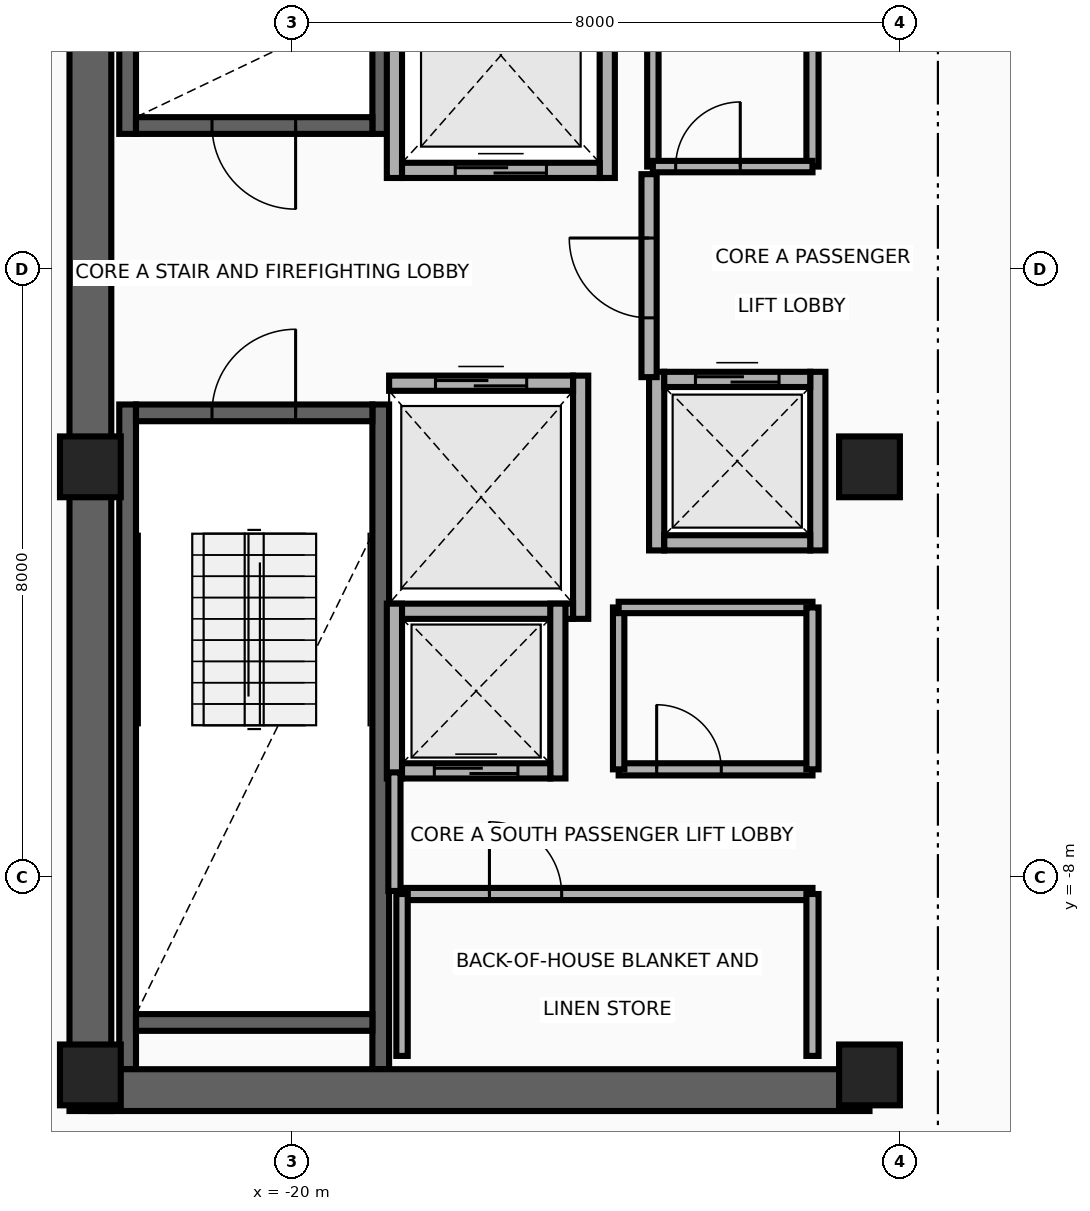
"""IFC4 building model, lengths in metres.
Left out: names, types, materials, properties, quantities, classifications, styles, units other than length and angle.
Written with IfcOpenShell. Run it as: python <this file> out.ifc"""

import sys

from ifc_helpers import new_model, si_unit, direction, frame, frame_2d, origin, origin_2d, place, context, subcontext, project, spatial, rectangle, extrude, source, transform, mapped, element, fill, save


model = new_model("IFC4")
c1 = context("Model", 3, precision=1e-05, world=origin(), true_north=direction((0.0, 1.0)))
c2 = subcontext(c1, "Body", "Model", "MODEL_VIEW")
j1 = project(units=[si_unit("LENGTHUNIT", "METRE"), si_unit("PLANEANGLEUNIT", "RADIAN")], contexts=[c1])
p1 = place(None, origin())
s1 = spatial("IfcSite", under=j1, at=p1, CompositionType="ELEMENT")
p2 = place(p1, origin())
s2 = spatial("IfcBuilding", under=s1, at=p2, CompositionType="ELEMENT")
p3 = place(p2, frame((0.0, 0.0, 276.5)))
s3 = spatial("IfcBuildingStorey", under=s2, at=p3, CompositionType="ELEMENT", Elevation=276.5)
for number, where, z_axis, x_axis in (
    (1, (-22.16, 1.78, 0.0), (0.0, 0.0, 1.0), (0.0, 1.0, 0.0)),
    (2, (-18.83, 1.78, 0.0), (0.0, 0.0, 1.0), (0.0, 1.0, 0.0)),
):
    element("IfcWall", number, at=place(p3, frame(where, z_axis=z_axis, x_axis=x_axis)), inside=s3, PredefinedType="SHEAR", context=c2, shape_type="SweptSolid", body=[
        extrude(rectangle(XDim=8.745, YDim=0.22, at=frame_2d((4.373, 0.0))), origin(), (0.0, 0.0, 1.0), 3.26),
    ])
p4 = place(p3, frame((-22.05, 1.89, 0.0), z_axis=(0.0, 0.0, 1.0), x_axis=(1.0, 0.0, 0.0)))
e3 = element("IfcWall", 3, at=p4, inside=s3, PredefinedType="SHEAR", context=c2, shape_type="SweptSolid", body=[
    extrude(rectangle(XDim=3.11, YDim=0.22, at=frame_2d((1.555, 0.0))), origin(), (0.0, 0.0, 1.0), 3.26),
])
p5 = place(p4, frame((1.0, 0.0, 0.0)))
e4 = element("IfcOpeningElement", 4, at=p5, cuts=e3, PredefinedType="OPENING", context=c2, shape_type="SweptSolid", body=[
    extrude(rectangle(XDim=1.1, YDim=2.15, at=frame_2d((0.55, 1.075))), frame((0.0, 0.125, 0.0), z_axis=(0.0, -1.0, 0.0), x_axis=(1.0, 0.0, 0.0)), (0.0, 0.0, 1.0), 0.25),
])
for number, where, z_axis, x_axis in (
    (5, (-22.16, -10.525, 0.0), (0.0, 0.0, 1.0), (0.0, 1.0, 0.0)),
    (6, (-18.83, -10.525, 0.0), (0.0, 0.0, 1.0), (0.0, 1.0, 0.0)),
):
    element("IfcWall", number, at=place(p3, frame(where, z_axis=z_axis, x_axis=x_axis)), inside=s3, PredefinedType="SHEAR", context=c2, shape_type="SweptSolid", body=[
        extrude(rectangle(XDim=8.745, YDim=0.22, at=frame_2d((4.373, 0.0))), origin(), (0.0, 0.0, 1.0), 3.26),
    ])
p6 = place(p3, frame((-22.05, -9.91, 0.0), z_axis=(0.0, 0.0, 1.0), x_axis=(1.0, 0.0, 0.0)))
e7 = element("IfcWall", 7, at=p6, inside=s3, PredefinedType="SHEAR", context=c2, shape_type="SweptSolid", body=[
    extrude(rectangle(XDim=3.11, YDim=0.22, at=frame_2d((1.555, 0.0))), origin(), (0.0, 0.0, 1.0), 3.26),
])
p7 = place(p3, frame((-22.05, -1.89, 0.0), z_axis=(0.0, 0.0, 1.0), x_axis=(1.0, 0.0, 0.0)))
e8 = element("IfcWall", 8, at=p7, inside=s3, PredefinedType="SHEAR", context=c2, shape_type="SweptSolid", body=[
    extrude(rectangle(XDim=3.11, YDim=0.22, at=frame_2d((1.555, 0.0))), origin(), (0.0, 0.0, 1.0), 3.26),
])
p8 = place(p7, frame((1.0, 0.0, 0.0)))
e9 = element("IfcOpeningElement", 9, at=p8, cuts=e8, PredefinedType="OPENING", context=c2, shape_type="SweptSolid", body=[
    extrude(rectangle(XDim=1.1, YDim=2.15, at=frame_2d((0.55, 1.075))), frame((0.0, 0.125, 0.0), z_axis=(0.0, -1.0, 0.0), x_axis=(1.0, 0.0, 0.0)), (0.0, 0.0, 1.0), 0.25),
])
p9 = place(p3, frame((-22.65, -11.075, 0.0), z_axis=(0.0, 0.0, 1.0), x_axis=(0.0, 1.0, 0.0)))
e10 = element("IfcWall", 10, at=p9, inside=s3, PredefinedType="SHEAR", context=c2, shape_type="SweptSolid", body=[
    extrude(rectangle(XDim=22.15, YDim=0.55, at=frame_2d((11.075, 0.0))), origin(), (0.0, 0.0, 1.0), 3.26),
])
p10 = place(p3, frame((-22.65, -10.8, 0.0), z_axis=(0.0, 0.0, 1.0), x_axis=(1.0, 0.0, 0.0)))
e11 = element("IfcWall", 11, at=p10, inside=s3, PredefinedType="SHEAR", context=c2, shape_type="SweptSolid", body=[
    extrude(rectangle(XDim=10.25, YDim=0.55, at=frame_2d((5.125, 0.0))), origin(), (0.0, 0.0, 1.0), 3.26),
])
m1 = source(origin(), c2, "Body", "SweptSolid", [
    extrude(rectangle(XDim=0.8, YDim=0.8, at=origin_2d()), origin(), (0.0, 0.0, 1.0), 3.5),
])
for number, where, z_axis, x_axis in (
    (12, (-22.65, -10.6, 0.0), (0.0, 0.0, 1.0), (1.0, 0.0, 0.0)),
    (13, (-12.4, -10.6, 0.0), (0.0, 0.0, 1.0), (1.0, 0.0, 0.0)),
    (14, (-22.65, -2.6, 0.0), (0.0, 0.0, 1.0), (1.0, 0.0, 0.0)),
    (15, (-12.4, -2.6, 0.0), (0.0, 0.0, 1.0), (1.0, 0.0, 0.0)),
):
    element("IfcColumn", number, at=place(p3, frame(where, z_axis=z_axis, x_axis=x_axis)), inside=s3, PredefinedType="COLUMN", context=c2, shape_type="MappedRepresentation", body=[
        mapped(m1, transform((0.0, 0.0, 0.0), x_axis=(1.0, 0.0, 0.0), y_axis=(0.0, 1.0, 0.0), z_axis=(0.0, 0.0, 1.0), scale=1.0)),
    ])
for number, where, z_axis, x_axis in (
    (16, (-18.65, 1.2, 0.0), (0.0, 0.0, 1.0), (0.0, 1.0, 0.0)),
    (17, (-15.85, 1.2, 0.0), (0.0, 0.0, 1.0), (0.0, 1.0, 0.0)),
):
    element("IfcWall", number, at=place(p3, frame(where, z_axis=z_axis, x_axis=x_axis)), inside=s3, PredefinedType="MOVABLE", context=c2, shape_type="SweptSolid", body=[
        extrude(rectangle(XDim=3.225, YDim=0.2, at=frame_2d((1.613, 0.0))), origin(), (0.0, 0.0, 1.0), 3.26),
    ])
p11 = place(p3, frame((-18.55, 1.3, 0.0), z_axis=(0.0, 0.0, 1.0), x_axis=(1.0, 0.0, 0.0)))
e18 = element("IfcWall", 18, at=p11, inside=s3, PredefinedType="MOVABLE", context=c2, shape_type="SweptSolid", body=[
    extrude(rectangle(XDim=2.6, YDim=0.2, at=frame_2d((1.3, 0.0))), origin(), (0.0, 0.0, 1.0), 3.26),
])
p12 = place(p11, frame((0.7, 0.0, 0.0)))
e19 = element("IfcOpeningElement", 19, at=p12, cuts=e18, PredefinedType="OPENING", context=c2, shape_type="SweptSolid", body=[
    extrude(rectangle(XDim=1.2, YDim=2.1, at=frame_2d((0.6, 1.05))), frame((0.0, 0.115, 0.0), z_axis=(0.0, -1.0, 0.0), x_axis=(1.0, 0.0, 0.0)), (0.0, 0.0, 1.0), 0.23),
])
p13 = place(p3, frame((-16.2, -4.6, 0.0), z_axis=(0.0, 0.0, 1.0), x_axis=(0.0, 1.0, 0.0)))
e20 = element("IfcWall", 20, at=p13, inside=s3, PredefinedType="MOVABLE", context=c2, shape_type="SweptSolid", body=[
    extrude(rectangle(XDim=3.2, YDim=0.2, at=frame_2d((1.6, 0.0))), origin(), (0.0, 0.0, 1.0), 3.26),
])
p14 = place(p3, frame((-18.72, -4.5, 0.0), z_axis=(0.0, 0.0, 1.0), x_axis=(1.0, 0.0, 0.0)))
e21 = element("IfcWall", 21, at=p14, inside=s3, PredefinedType="MOVABLE", context=c2, shape_type="SweptSolid", body=[
    extrude(rectangle(XDim=2.42, YDim=0.2, at=frame_2d((1.21, 0.0))), origin(), (0.0, 0.0, 1.0), 3.26),
])
p15 = place(p3, frame((-18.72, -1.5, 0.0), z_axis=(0.0, 0.0, 1.0), x_axis=(1.0, 0.0, 0.0)))
e22 = element("IfcWall", 22, at=p15, inside=s3, PredefinedType="MOVABLE", context=c2, shape_type="SweptSolid", body=[
    extrude(rectangle(XDim=2.42, YDim=0.2, at=frame_2d((1.21, 0.0))), origin(), (0.0, 0.0, 1.0), 3.26),
])
p16 = place(p15, frame((0.61, 0.0, 0.0)))
e23 = element("IfcOpeningElement", 23, at=p16, cuts=e22, PredefinedType="OPENING", context=c2, shape_type="SweptSolid", body=[
    extrude(rectangle(XDim=1.2, YDim=2.1, at=frame_2d((0.6, 1.05))), frame((0.0, 0.115, 0.0), z_axis=(0.0, -1.0, 0.0), x_axis=(1.0, 0.0, 0.0)), (0.0, 0.0, 1.0), 0.23),
])
for number, where, z_axis, x_axis in (
    (24, (-18.65, -6.7, 0.0), (0.0, 0.0, 1.0), (0.0, 1.0, 0.0)),
    (25, (-16.5, -6.7, 0.0), (0.0, 0.0, 1.0), (0.0, 1.0, 0.0)),
):
    element("IfcWall", number, at=place(p3, frame(where, z_axis=z_axis, x_axis=x_axis)), inside=s3, PredefinedType="MOVABLE", context=c2, shape_type="SweptSolid", body=[
        extrude(rectangle(XDim=2.3, YDim=0.2, at=frame_2d((1.15, 0.0))), origin(), (0.0, 0.0, 1.0), 3.26),
    ])
p17 = place(p3, frame((-18.55, -6.6, 0.0), z_axis=(0.0, 0.0, 1.0), x_axis=(1.0, 0.0, 0.0)))
e26 = element("IfcWall", 26, at=p17, inside=s3, PredefinedType="MOVABLE", context=c2, shape_type="SweptSolid", body=[
    extrude(rectangle(XDim=1.95, YDim=0.2, at=frame_2d((0.975, 0.0))), origin(), (0.0, 0.0, 1.0), 3.26),
])
p18 = place(p17, frame((0.425, 0.0, 0.0)))
e27 = element("IfcOpeningElement", 27, at=p18, cuts=e26, PredefinedType="OPENING", context=c2, shape_type="SweptSolid", body=[
    extrude(rectangle(XDim=1.1, YDim=2.1, at=frame_2d((0.55, 1.05))), frame((0.0, 0.115, 0.0), z_axis=(0.0, -1.0, 0.0), x_axis=(1.0, 0.0, 0.0)), (0.0, 0.0, 1.0), 0.23),
])
for number, where, z_axis, x_axis in (
    (28, (-15.2, -3.7, 0.0), (0.0, 0.0, 1.0), (0.0, 1.0, 0.0)),
    (29, (-13.08, -3.7, 0.0), (0.0, 0.0, 1.0), (0.0, 1.0, 0.0)),
):
    element("IfcWall", number, at=place(p3, frame(where, z_axis=z_axis, x_axis=x_axis)), inside=s3, PredefinedType="MOVABLE", context=c2, shape_type="SweptSolid", body=[
        extrude(rectangle(XDim=2.35, YDim=0.2, at=frame_2d((1.175, 0.0))), origin(), (0.0, 0.0, 1.0), 3.26),
    ])
p19 = place(p3, frame((-15.1, -3.6, 0.0), z_axis=(0.0, 0.0, 1.0), x_axis=(1.0, 0.0, 0.0)))
e30 = element("IfcWall", 30, at=p19, inside=s3, PredefinedType="MOVABLE", context=c2, shape_type="SweptSolid", body=[
    extrude(rectangle(XDim=1.92, YDim=0.2, at=frame_2d((0.96, 0.0))), origin(), (0.0, 0.0, 1.0), 3.26),
])
p20 = place(p3, frame((-15.1, -1.45, 0.0), z_axis=(0.0, 0.0, 1.0), x_axis=(1.0, 0.0, 0.0)))
e31 = element("IfcWall", 31, at=p20, inside=s3, PredefinedType="MOVABLE", context=c2, shape_type="SweptSolid", body=[
    extrude(rectangle(XDim=1.92, YDim=0.2, at=frame_2d((0.96, 0.0))), origin(), (0.0, 0.0, 1.0), 3.26),
])
p21 = place(p20, frame((0.41, 0.0, 0.0)))
e32 = element("IfcOpeningElement", 32, at=p21, cuts=e31, PredefinedType="OPENING", context=c2, shape_type="SweptSolid", body=[
    extrude(rectangle(XDim=1.1, YDim=2.1, at=frame_2d((0.55, 1.05))), frame((0.0, 0.115, 0.0), z_axis=(0.0, -1.0, 0.0), x_axis=(1.0, 0.0, 0.0)), (0.0, 0.0, 1.0), 0.23),
])
p22 = place(p3, frame((-15.3, -1.42, 0.0), z_axis=(0.0, 0.0, 1.0), x_axis=(0.0, 1.0, 0.0)))
e33 = element("IfcWall", 33, at=p22, inside=s3, PredefinedType="PARTITIONING", context=c2, shape_type="SweptSolid", body=[
    extrude(rectangle(XDim=2.67, YDim=0.2, at=frame_2d((1.335, 0.0))), origin(), (0.0, 0.0, 1.0), 3.26),
])
p23 = place(p22, frame((0.78, 0.0, 0.0)))
e34 = element("IfcOpeningElement", 34, at=p23, cuts=e33, PredefinedType="OPENING", context=c2, shape_type="SweptSolid", body=[
    extrude(rectangle(XDim=1.05, YDim=2.15, at=frame_2d((0.525, 1.075))), frame((0.0, 0.115, 0.0), z_axis=(0.0, -1.0, 0.0), x_axis=(1.0, 0.0, 0.0)), (0.0, 0.0, 1.0), 0.23),
])
p24 = place(p3, frame((-18.65, -8.18, 0.0), z_axis=(0.0, 0.0, 1.0), x_axis=(0.0, 1.0, 0.0)))
e35 = element("IfcWall", 35, at=p24, inside=s3, PredefinedType="PARTITIONING", context=c2, shape_type="SweptSolid", body=[
    extrude(rectangle(XDim=1.56, YDim=0.16, at=frame_2d((0.78, 0.0))), origin(), (0.0, 0.0, 1.0), 3.26),
])
p25 = place(p3, frame((-18.55, -8.22, 0.0), z_axis=(0.0, 0.0, 1.0), x_axis=(1.0, 0.0, 0.0)))
e36 = element("IfcWall", 36, at=p25, inside=s3, PredefinedType="PARTITIONING", context=c2, shape_type="SweptSolid", body=[
    extrude(rectangle(XDim=5.4, YDim=0.16, at=frame_2d((2.7, 0.0))), origin(), (0.0, 0.0, 1.0), 3.26),
])
p26 = place(p25, frame((1.15, 0.0, 0.0)))
e37 = element("IfcOpeningElement", 37, at=p26, cuts=e36, PredefinedType="OPENING", context=c2, shape_type="SweptSolid", body=[
    extrude(rectangle(XDim=0.95, YDim=2.15, at=frame_2d((0.475, 1.075))), frame((0.0, 0.095, 0.0), z_axis=(0.0, -1.0, 0.0), x_axis=(1.0, 0.0, 0.0)), (0.0, 0.0, 1.0), 0.19),
])
p27 = place(p3, frame((-18.55, -10.35, 0.0), z_axis=(0.0, 0.0, 1.0), x_axis=(0.0, 1.0, 0.0)))
e38 = element("IfcWall", 38, at=p27, inside=s3, PredefinedType="PARTITIONING", context=c2, shape_type="SweptSolid", body=[
    extrude(rectangle(XDim=2.13, YDim=0.15, at=frame_2d((1.065, 0.0))), origin(), (0.0, 0.0, 1.0), 3.26),
])
p28 = place(p3, frame((-13.15, -10.35, 0.0), z_axis=(0.0, 0.0, 1.0), x_axis=(0.0, 1.0, 0.0)))
e39 = element("IfcWall", 39, at=p28, inside=s3, PredefinedType="PARTITIONING", context=c2, shape_type="SweptSolid", body=[
    extrude(rectangle(XDim=2.13, YDim=0.16, at=frame_2d((1.065, 0.0))), origin(), (0.0, 0.0, 1.0), 3.26),
])
p29 = place(p3, frame((-15.7, -6.58, 0.0), z_axis=(0.0, 0.0, 1.0), x_axis=(1.0, 0.0, 0.0)))
e40 = element("IfcWall", 40, at=p29, inside=s3, PredefinedType="PARTITIONING", context=c2, shape_type="SweptSolid", body=[
    extrude(rectangle(XDim=2.55, YDim=0.16, at=frame_2d((1.275, 0.0))), origin(), (0.0, 0.0, 1.0), 3.26),
])
p30 = place(p29, frame((0.5, 0.0, 0.0)))
e41 = element("IfcOpeningElement", 41, at=p30, cuts=e40, PredefinedType="OPENING", context=c2, shape_type="SweptSolid", body=[
    extrude(rectangle(XDim=0.85, YDim=2.05, at=frame_2d((0.425, 1.025))), frame((0.0, 0.095, 0.0), z_axis=(0.0, -1.0, 0.0), x_axis=(1.0, 0.0, 0.0)), (0.0, 0.0, 1.0), 0.19),
])
p31 = place(p3, frame((-15.7, -6.58, 0.0), z_axis=(0.0, 0.0, 1.0), x_axis=(0.0, 1.0, 0.0)))
e42 = element("IfcWall", 42, at=p31, inside=s3, PredefinedType="PARTITIONING", context=c2, shape_type="SweptSolid", body=[
    extrude(rectangle(XDim=2.13, YDim=0.15, at=frame_2d((1.065, 0.0))), origin(), (0.0, 0.0, 1.0), 3.26),
])
p32 = place(p3, frame((-15.7, -4.45, 0.0), z_axis=(0.0, 0.0, 1.0), x_axis=(1.0, 0.0, 0.0)))
e43 = element("IfcWall", 43, at=p32, inside=s3, PredefinedType="PARTITIONING", context=c2, shape_type="SweptSolid", body=[
    extrude(rectangle(XDim=2.55, YDim=0.15, at=frame_2d((1.275, 0.0))), origin(), (0.0, 0.0, 1.0), 3.26),
])
p33 = place(p3, frame((-13.15, -6.58, 0.0), z_axis=(0.0, 0.0, 1.0), x_axis=(0.0, 1.0, 0.0)))
e44 = element("IfcWall", 44, at=p33, inside=s3, PredefinedType="PARTITIONING", context=c2, shape_type="SweptSolid", body=[
    extrude(rectangle(XDim=2.13, YDim=0.16, at=frame_2d((1.065, 0.0))), origin(), (0.0, 0.0, 1.0), 3.26),
])
p34 = place(p3, frame((-13.15, 1.35, 0.0), z_axis=(0.0, 0.0, 1.0), x_axis=(0.0, 1.0, 0.0)))
e45 = element("IfcWall", 45, at=p34, inside=s3, PredefinedType="PARTITIONING", context=c2, shape_type="SweptSolid", body=[
    extrude(rectangle(XDim=1.95, YDim=0.16, at=frame_2d((0.975, 0.0))), origin(), (0.0, 0.0, 1.0), 3.26),
])
p35 = place(p3, frame((-15.25, 1.35, 0.0), z_axis=(0.0, 0.0, 1.0), x_axis=(0.0, 1.0, 0.0)))
e46 = element("IfcWall", 46, at=p35, inside=s3, PredefinedType="PARTITIONING", context=c2, shape_type="SweptSolid", body=[
    extrude(rectangle(XDim=1.95, YDim=0.15, at=frame_2d((0.975, 0.0))), origin(), (0.0, 0.0, 1.0), 3.26),
])
p36 = place(p3, frame((-15.25, 1.35, 0.0), z_axis=(0.0, 0.0, 1.0), x_axis=(1.0, 0.0, 0.0)))
e47 = element("IfcWall", 47, at=p36, inside=s3, PredefinedType="PARTITIONING", context=c2, shape_type="SweptSolid", body=[
    extrude(rectangle(XDim=2.1, YDim=0.15, at=frame_2d((1.05, 0.0))), origin(), (0.0, 0.0, 1.0), 3.26),
])
p37 = place(p36, frame((0.3, 0.0, 0.0)))
e48 = element("IfcOpeningElement", 48, at=p37, cuts=e47, PredefinedType="OPENING", context=c2, shape_type="SweptSolid", body=[
    extrude(rectangle(XDim=0.85, YDim=2.05, at=frame_2d((0.425, 1.025))), frame((0.0, 0.09, 0.0), z_axis=(0.0, -1.0, 0.0), x_axis=(1.0, 0.0, 0.0)), (0.0, 0.0, 1.0), 0.18),
])
p38 = place(p12, origin())
e49 = element("IfcDoor", 49, at=p38, inside=s3, OperationType="DOUBLE_DOOR_SLIDING", PredefinedType="DOOR", context=c2, shape_type="SweptSolid", body=[
    extrude(rectangle(XDim=1.2, YDim=2.1, at=frame_2d((0.6, 1.05))), frame((0.0, 0.025, 0.0), z_axis=(0.0, -1.0, 0.0), x_axis=(1.0, 0.0, 0.0)), (0.0, 0.0, 1.0), 0.05),
])
fill(e19, e49)
p39 = place(p16, origin())
e50 = element("IfcDoor", 50, at=p39, inside=s3, OperationType="DOUBLE_DOOR_SLIDING", PredefinedType="DOOR", context=c2, shape_type="SweptSolid", body=[
    extrude(rectangle(XDim=1.2, YDim=2.1, at=frame_2d((0.6, 1.05))), frame((0.0, 0.025, 0.0), z_axis=(0.0, -1.0, 0.0), x_axis=(1.0, 0.0, 0.0)), (0.0, 0.0, 1.0), 0.05),
])
fill(e23, e50)
p40 = place(p18, origin())
e51 = element("IfcDoor", 51, at=p40, inside=s3, OperationType="DOUBLE_DOOR_SLIDING", PredefinedType="DOOR", context=c2, shape_type="SweptSolid", body=[
    extrude(rectangle(XDim=1.1, YDim=2.1, at=frame_2d((0.55, 1.05))), frame((0.0, 0.025, 0.0), z_axis=(0.0, -1.0, 0.0), x_axis=(1.0, 0.0, 0.0)), (0.0, 0.0, 1.0), 0.05),
])
fill(e27, e51)
p41 = place(p21, origin())
e52 = element("IfcDoor", 52, at=p41, inside=s3, OperationType="DOUBLE_DOOR_SLIDING", PredefinedType="DOOR", context=c2, shape_type="SweptSolid", body=[
    extrude(rectangle(XDim=1.1, YDim=2.1, at=frame_2d((0.55, 1.05))), frame((0.0, 0.025, 0.0), z_axis=(0.0, -1.0, 0.0), x_axis=(1.0, 0.0, 0.0)), (0.0, 0.0, 1.0), 0.05),
])
fill(e32, e52)
p42 = place(p23, origin())
e53 = element("IfcDoor", 53, at=p42, inside=s3, OperationType="SINGLE_SWING_RIGHT", PredefinedType="DOOR", context=c2, shape_type="SweptSolid", body=[
    extrude(rectangle(XDim=1.05, YDim=2.15, at=frame_2d((0.525, 1.075))), frame((0.0, 0.025, 0.0), z_axis=(0.0, -1.0, 0.0), x_axis=(1.0, 0.0, 0.0)), (0.0, 0.0, 1.0), 0.05),
])
fill(e34, e53)
p43 = place(p5, frame((1.1, 0.0, 0.0), z_axis=(0.0, 0.0, 1.0), x_axis=(-1.0, 0.0, 0.0)))
e54 = element("IfcDoor", 54, at=p43, inside=s3, OperationType="SINGLE_SWING_LEFT", PredefinedType="DOOR", context=c2, shape_type="SweptSolid", body=[
    extrude(rectangle(XDim=1.1, YDim=2.15, at=frame_2d((0.55, 1.075))), frame((0.0, 0.025, 0.0), z_axis=(0.0, -1.0, 0.0), x_axis=(1.0, 0.0, 0.0)), (0.0, 0.0, 1.0), 0.05),
])
fill(e4, e54)
p44 = place(p8, origin())
e55 = element("IfcDoor", 55, at=p44, inside=s3, OperationType="SINGLE_SWING_RIGHT", PredefinedType="DOOR", context=c2, shape_type="SweptSolid", body=[
    extrude(rectangle(XDim=1.1, YDim=2.15, at=frame_2d((0.55, 1.075))), frame((0.0, 0.025, 0.0), z_axis=(0.0, -1.0, 0.0), x_axis=(1.0, 0.0, 0.0)), (0.0, 0.0, 1.0), 0.05),
])
fill(e9, e55)
p45 = place(p26, origin())
e56 = element("IfcDoor", 56, at=p45, inside=s3, OperationType="SINGLE_SWING_LEFT", PredefinedType="DOOR", context=c2, shape_type="SweptSolid", body=[
    extrude(rectangle(XDim=0.95, YDim=2.15, at=frame_2d((0.475, 1.075))), frame((0.0, 0.025, 0.0), z_axis=(0.0, -1.0, 0.0), x_axis=(1.0, 0.0, 0.0)), (0.0, 0.0, 1.0), 0.05),
])
fill(e37, e56)
p46 = place(p30, origin())
e57 = element("IfcDoor", 57, at=p46, inside=s3, OperationType="SINGLE_SWING_RIGHT", PredefinedType="DOOR", context=c2, shape_type="SweptSolid", body=[
    extrude(rectangle(XDim=0.85, YDim=2.05, at=frame_2d((0.425, 1.025))), frame((0.0, 0.025, 0.0), z_axis=(0.0, -1.0, 0.0), x_axis=(1.0, 0.0, 0.0)), (0.0, 0.0, 1.0), 0.05),
])
fill(e41, e57)
p47 = place(p37, origin())
e58 = element("IfcDoor", 58, at=p47, inside=s3, OperationType="SINGLE_SWING_LEFT", PredefinedType="DOOR", context=c2, shape_type="SweptSolid", body=[
    extrude(rectangle(XDim=0.85, YDim=2.05, at=frame_2d((0.425, 1.025))), frame((0.0, 0.025, 0.0), z_axis=(0.0, -1.0, 0.0), x_axis=(1.0, 0.0, 0.0)), (0.0, 0.0, 1.0), 0.05),
])
fill(e48, e58)
save(model, sys.argv[1])
